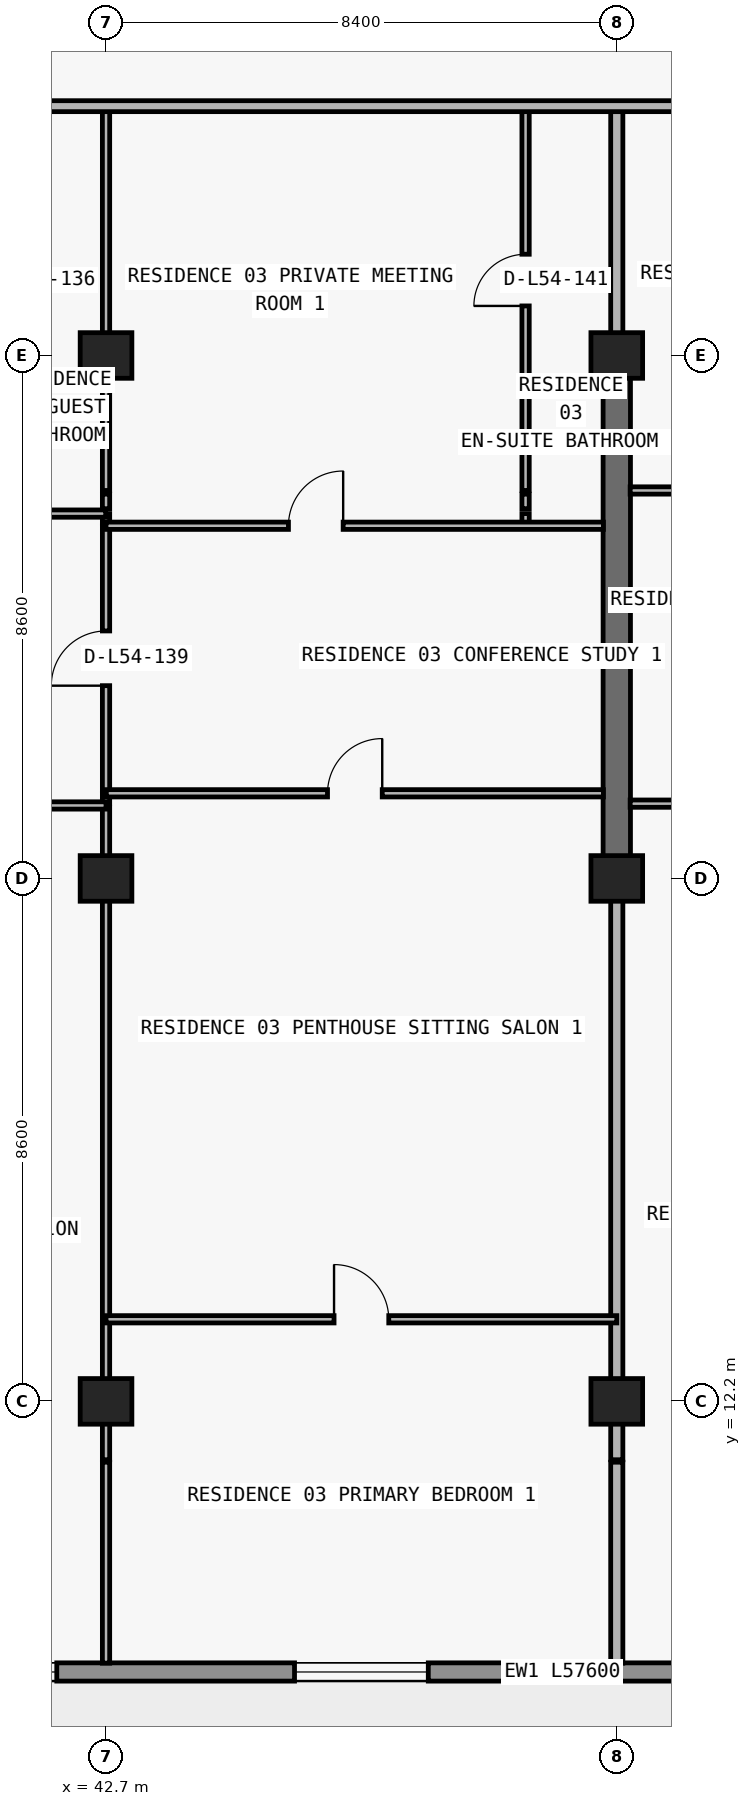
"""IFC4 building model, lengths in metres.
Left out: names, types, materials, properties, quantities, classifications, styles, units other than length and angle.
Written with IfcOpenShell. Run it as: python <this file> out.ifc"""

import sys

from ifc_helpers import new_model, si_unit, direction, frame, frame_2d, origin, origin_2d, place, context, subcontext, project, spatial, rectangle, extrude, element, fill, save


model = new_model("IFC4")
c1 = context("Model", 3, precision=1e-05, world=origin(), true_north=direction((0.0, 1.0)))
c2 = subcontext(c1, "Body", "Model", "MODEL_VIEW")
j1 = project(units=[si_unit("LENGTHUNIT", "METRE"), si_unit("PLANEANGLEUNIT", "RADIAN")], contexts=[c1])
p1 = place(None, origin())
s1 = spatial("IfcSite", under=j1, at=p1, CompositionType="ELEMENT")
p2 = place(p1, origin())
s2 = spatial("IfcBuilding", under=s1, at=p2, CompositionType="ELEMENT")
p3 = place(p2, frame((0.0, 0.0, 195.0)))
s3 = spatial("IfcBuildingStorey", under=s2, at=p3, CompositionType="ELEMENT", Elevation=195.0)
for number, where, z_axis, x_axis in (
    (1, (42.7, 12.2, 0.0), (0.0, 0.0, 1.0), (1.0, 0.0, 0.0)),
    (2, (51.1, 12.2, 0.0), (0.0, 0.0, 1.0), (1.0, 0.0, 0.0)),
    (3, (42.7, 20.8, 0.0), (0.0, 0.0, 1.0), (1.0, 0.0, 0.0)),
    (4, (51.1, 20.8, 0.0), (0.0, 0.0, 1.0), (1.0, 0.0, 0.0)),
    (5, (42.7, 29.4, 0.0), (0.0, 0.0, 1.0), (1.0, 0.0, 0.0)),
    (6, (51.1, 29.4, 0.0), (0.0, 0.0, 1.0), (1.0, 0.0, 0.0)),
):
    element("IfcColumn", number, at=place(p3, frame(where, z_axis=z_axis, x_axis=x_axis)), inside=s3, PredefinedType="COLUMN", context=c2, shape_type="SweptSolid", body=[
        extrude(rectangle(XDim=0.85, YDim=0.75, at=origin_2d()), origin(), (0.0, 0.0, 1.0), 3.05),
    ])
p4 = place(p3, frame((51.1, 20.8, 0.0), z_axis=(0.0, 0.0, 1.0), x_axis=(0.0, 1.0, 0.0)))
e7 = element("IfcWall", 7, at=p4, inside=s3, PredefinedType="SHEAR", context=c2, shape_type="SweptSolid", body=[
    extrude(rectangle(XDim=8.6, YDim=0.45, at=frame_2d((4.3, 0.0))), origin(), (0.0, 0.0, 1.0), 3.05),
])
p5 = place(p3, frame((67.7, 7.75, 0.0), z_axis=(0.0, 0.0, 1.0), x_axis=(-1.0, 0.0, 0.0)))
e8 = element("IfcWall", 8, at=p5, inside=s3, PredefinedType="STANDARD", context=c2, shape_type="SweptSolid", body=[
    extrude(rectangle(XDim=57.6, YDim=0.3, at=frame_2d((28.8, 0.0))), origin(), (0.0, 0.0, 1.0), 3.05),
])
p6 = place(p5, frame((54.69, 0.0, 0.0)))
e9 = element("IfcOpeningElement", 9, at=p6, cuts=e8, PredefinedType="OPENING", context=c2, shape_type="SweptSolid", body=[
    extrude(rectangle(XDim=2.0, YDim=2.3, at=frame_2d((1.0, 1.15))), frame((0.0, 0.16, 0.0), z_axis=(0.0, -1.0, 0.0), x_axis=(1.0, 0.0, 0.0)), (0.0, 0.0, 1.0), 0.32),
])
p7 = place(p5, frame((50.21, 0.0, 0.65)))
e10 = element("IfcOpeningElement", 10, at=p7, cuts=e8, PredefinedType="OPENING", context=c2, shape_type="SweptSolid", body=[
    extrude(rectangle(XDim=2.6, YDim=1.85, at=frame_2d((1.3, 0.925))), frame((0.0, 0.16, 0.0), z_axis=(0.0, -1.0, 0.0), x_axis=(1.0, 0.0, 0.0)), (0.0, 0.0, 1.0), 0.32),
])
p8 = place(p5, frame((44.1, 0.0, 0.85)))
e11 = element("IfcOpeningElement", 11, at=p8, cuts=e8, PredefinedType="OPENING", context=c2, shape_type="SweptSolid", body=[
    extrude(rectangle(XDim=2.2, YDim=1.55, at=frame_2d((1.1, 0.775))), frame((0.0, 0.16, 0.0), z_axis=(0.0, -1.0, 0.0), x_axis=(1.0, 0.0, 0.0)), (0.0, 0.0, 1.0), 0.32),
])
p9 = place(p5, frame((37.69, 0.0, 0.0)))
e12 = element("IfcOpeningElement", 12, at=p9, cuts=e8, PredefinedType="OPENING", context=c2, shape_type="SweptSolid", body=[
    extrude(rectangle(XDim=2.0, YDim=2.3, at=frame_2d((1.0, 1.15))), frame((0.0, 0.16, 0.0), z_axis=(0.0, -1.0, 0.0), x_axis=(1.0, 0.0, 0.0)), (0.0, 0.0, 1.0), 0.32),
])
p10 = place(p5, frame((33.59, 0.0, 0.85)))
e13 = element("IfcOpeningElement", 13, at=p10, cuts=e8, PredefinedType="OPENING", context=c2, shape_type="SweptSolid", body=[
    extrude(rectangle(XDim=1.8, YDim=1.55, at=frame_2d((0.9, 0.775))), frame((0.0, 0.16, 0.0), z_axis=(0.0, -1.0, 0.0), x_axis=(1.0, 0.0, 0.0)), (0.0, 0.0, 1.0), 0.32),
])
p11 = place(p5, frame((29.69, 0.0, 0.0)))
e14 = element("IfcOpeningElement", 14, at=p11, cuts=e8, PredefinedType="OPENING", context=c2, shape_type="SweptSolid", body=[
    extrude(rectangle(XDim=2.0, YDim=2.3, at=frame_2d((1.0, 1.15))), frame((0.0, 0.16, 0.0), z_axis=(0.0, -1.0, 0.0), x_axis=(1.0, 0.0, 0.0)), (0.0, 0.0, 1.0), 0.32),
])
p12 = place(p5, frame((25.81, 0.0, 0.65)))
e15 = element("IfcOpeningElement", 15, at=p12, cuts=e8, PredefinedType="OPENING", context=c2, shape_type="SweptSolid", body=[
    extrude(rectangle(XDim=2.6, YDim=1.85, at=frame_2d((1.3, 0.925))), frame((0.0, 0.16, 0.0), z_axis=(0.0, -1.0, 0.0), x_axis=(1.0, 0.0, 0.0)), (0.0, 0.0, 1.0), 0.32),
])
p13 = place(p5, frame((19.7, 0.0, 0.85)))
e16 = element("IfcOpeningElement", 16, at=p13, cuts=e8, PredefinedType="OPENING", context=c2, shape_type="SweptSolid", body=[
    extrude(rectangle(XDim=2.2, YDim=1.55, at=frame_2d((1.1, 0.775))), frame((0.0, 0.16, 0.0), z_axis=(0.0, -1.0, 0.0), x_axis=(1.0, 0.0, 0.0)), (0.0, 0.0, 1.0), 0.32),
])
p14 = place(p5, frame((13.29, 0.0, 0.0)))
e17 = element("IfcOpeningElement", 17, at=p14, cuts=e8, PredefinedType="OPENING", context=c2, shape_type="SweptSolid", body=[
    extrude(rectangle(XDim=2.0, YDim=2.3, at=frame_2d((1.0, 1.15))), frame((0.0, 0.16, 0.0), z_axis=(0.0, -1.0, 0.0), x_axis=(1.0, 0.0, 0.0)), (0.0, 0.0, 1.0), 0.32),
])
p15 = place(p5, frame((9.19, 0.0, 0.85)))
e18 = element("IfcOpeningElement", 18, at=p15, cuts=e8, PredefinedType="OPENING", context=c2, shape_type="SweptSolid", body=[
    extrude(rectangle(XDim=1.8, YDim=1.55, at=frame_2d((0.9, 0.775))), frame((0.0, 0.16, 0.0), z_axis=(0.0, -1.0, 0.0), x_axis=(1.0, 0.0, 0.0)), (0.0, 0.0, 1.0), 0.32),
])
p16 = place(p5, frame((5.273, 0.0, 0.0)))
e19 = element("IfcOpeningElement", 19, at=p16, cuts=e8, PredefinedType="OPENING", context=c2, shape_type="SweptSolid", body=[
    extrude(rectangle(XDim=2.0, YDim=2.3, at=frame_2d((1.0, 1.15))), frame((0.0, 0.16, 0.0), z_axis=(0.0, -1.0, 0.0), x_axis=(1.0, 0.0, 0.0)), (0.0, 0.0, 1.0), 0.32),
])
p17 = place(p5, frame((1.073, 0.0, 0.85)))
e20 = element("IfcOpeningElement", 20, at=p17, cuts=e8, PredefinedType="OPENING", context=c2, shape_type="SweptSolid", body=[
    extrude(rectangle(XDim=2.2, YDim=1.55, at=frame_2d((1.1, 0.775))), frame((0.0, 0.16, 0.0), z_axis=(0.0, -1.0, 0.0), x_axis=(1.0, 0.0, 0.0)), (0.0, 0.0, 1.0), 0.32),
])
p18 = place(p3, frame((42.7, 7.895, 0.0), z_axis=(0.0, 0.0, 1.0), x_axis=(0.0, 1.0, 0.0)))
e21 = element("IfcWall", 21, at=p18, inside=s3, PredefinedType="PARTITIONING", context=c2, shape_type="SweptSolid", body=[
    extrude(rectangle(XDim=3.305, YDim=0.12, at=frame_2d((1.652, 0.0))), origin(), (0.0, 0.0, 1.0), 3.05),
])
p19 = place(p3, frame((42.7, 11.24, 0.0), z_axis=(0.0, 0.0, 1.0), x_axis=(0.0, 1.0, 0.0)))
e22 = element("IfcWall", 22, at=p19, inside=s3, PredefinedType="PARTITIONING", context=c2, shape_type="SweptSolid", body=[
    extrude(rectangle(XDim=10.73, YDim=0.12, at=frame_2d((5.365, 0.0))), origin(), (0.0, 0.0, 1.0), 2.263),
])
p20 = place(p3, frame((42.7, 22.04, 0.0), z_axis=(0.0, 0.0, 1.0), x_axis=(0.0, 1.0, 0.0)))
e23 = element("IfcWall", 23, at=p20, inside=s3, PredefinedType="PARTITIONING", context=c2, shape_type="SweptSolid", body=[
    extrude(rectangle(XDim=0.16, YDim=0.12, at=frame_2d((0.08, 0.0))), origin(), (0.0, 0.0, 1.0), 2.263),
])
p21 = place(p3, frame((42.7, 22.24, 0.0), z_axis=(0.0, 0.0, 1.0), x_axis=(0.0, 1.0, 0.0)))
e24 = element("IfcWall", 24, at=p21, inside=s3, PredefinedType="PARTITIONING", context=c2, shape_type="SweptSolid", body=[
    extrude(rectangle(XDim=4.36, YDim=0.12, at=frame_2d((2.18, 0.0))), origin(), (0.0, 0.0, 1.0), 2.263),
])
p22 = place(p21, frame((1.73, 0.0, 0.0)))
e25 = element("IfcOpeningElement", 25, at=p22, cuts=e24, PredefinedType="OPENING", context=c2, shape_type="SweptSolid", body=[
    extrude(rectangle(XDim=0.9, YDim=2.15, at=frame_2d((0.45, 1.075))), frame((0.0, 0.07, 0.0), z_axis=(0.0, -1.0, 0.0), x_axis=(1.0, 0.0, 0.0)), (0.0, 0.0, 1.0), 0.14),
])
p23 = place(p3, frame((42.7, 26.64, 0.0), z_axis=(0.0, 0.0, 1.0), x_axis=(0.0, 1.0, 0.0)))
e26 = element("IfcWall", 26, at=p23, inside=s3, PredefinedType="PARTITIONING", context=c2, shape_type="SweptSolid", body=[
    extrude(rectangle(XDim=0.16, YDim=0.12, at=frame_2d((0.08, 0.0))), origin(), (0.0, 0.0, 1.0), 2.263),
])
p24 = place(p3, frame((42.7, 26.88, 0.0), z_axis=(0.0, 0.0, 1.0), x_axis=(0.0, 1.0, 0.0)))
e27 = element("IfcWall", 27, at=p24, inside=s3, PredefinedType="PARTITIONING", context=c2, shape_type="SweptSolid", body=[
    extrude(rectangle(XDim=0.24, YDim=0.12, at=frame_2d((0.12, 0.0))), origin(), (0.0, 0.0, 1.0), 2.263),
])
p25 = place(p3, frame((42.7, 27.18, 0.0), z_axis=(0.0, 0.0, 1.0), x_axis=(0.0, 1.0, 0.0)))
e28 = element("IfcWall", 28, at=p25, inside=s3, PredefinedType="PARTITIONING", context=c2, shape_type="SweptSolid", body=[
    extrude(rectangle(XDim=6.32, YDim=0.12, at=frame_2d((3.16, 0.0))), origin(), (0.0, 0.0, 1.0), 2.263),
])
p26 = place(p3, frame((49.6, 26.64, 0.0), z_axis=(0.0, 0.0, 1.0), x_axis=(0.0, 1.0, 0.0)))
e29 = element("IfcWall", 29, at=p26, inside=s3, PredefinedType="PARTITIONING", context=c2, shape_type="SweptSolid", body=[
    extrude(rectangle(XDim=0.16, YDim=0.12, at=frame_2d((0.08, 0.0))), origin(), (0.0, 0.0, 1.0), 3.05),
])
p27 = place(p3, frame((49.6, 26.88, 0.0), z_axis=(0.0, 0.0, 1.0), x_axis=(0.0, 1.0, 0.0)))
e30 = element("IfcWall", 30, at=p27, inside=s3, PredefinedType="PARTITIONING", context=c2, shape_type="SweptSolid", body=[
    extrude(rectangle(XDim=0.24, YDim=0.12, at=frame_2d((0.12, 0.0))), origin(), (0.0, 0.0, 1.0), 3.05),
])
p28 = place(p3, frame((49.6, 27.18, 0.0), z_axis=(0.0, 0.0, 1.0), x_axis=(0.0, 1.0, 0.0)))
e31 = element("IfcWall", 31, at=p28, inside=s3, PredefinedType="PARTITIONING", context=c2, shape_type="SweptSolid", body=[
    extrude(rectangle(XDim=6.32, YDim=0.12, at=frame_2d((3.16, 0.0))), origin(), (0.0, 0.0, 1.0), 3.05),
])
p29 = place(p28, frame((3.035, 0.0, 0.0)))
e32 = element("IfcOpeningElement", 32, at=p29, cuts=e31, PredefinedType="OPENING", context=c2, shape_type="SweptSolid", body=[
    extrude(rectangle(XDim=0.85, YDim=2.1, at=frame_2d((0.425, 1.05))), frame((0.0, 0.07, 0.0), z_axis=(0.0, -1.0, 0.0), x_axis=(1.0, 0.0, 0.0)), (0.0, 0.0, 1.0), 0.14),
])
p30 = place(p3, frame((51.1, 7.895, 0.0), z_axis=(0.0, 0.0, 1.0), x_axis=(0.0, 1.0, 0.0)))
e33 = element("IfcWall", 33, at=p30, inside=s3, PredefinedType="PARTITIONING", context=c2, shape_type="SweptSolid", body=[
    extrude(rectangle(XDim=3.305, YDim=0.2, at=frame_2d((1.652, 0.0))), origin(), (0.0, 0.0, 1.0), 3.05),
])
p31 = place(p3, frame((51.1, 11.24, 0.0), z_axis=(0.0, 0.0, 1.0), x_axis=(0.0, 1.0, 0.0)))
e34 = element("IfcWall", 34, at=p31, inside=s3, PredefinedType="PARTITIONING", context=c2, shape_type="SweptSolid", body=[
    extrude(rectangle(XDim=9.555, YDim=0.2, at=frame_2d((4.777, 0.0))), origin(), (0.0, 0.0, 1.0), 2.263),
])
p32 = place(p3, frame((51.1, 29.405, 0.0), z_axis=(0.0, 0.0, 1.0), x_axis=(0.0, 1.0, 0.0)))
e35 = element("IfcWall", 35, at=p32, inside=s3, PredefinedType="PARTITIONING", context=c2, shape_type="SweptSolid", body=[
    extrude(rectangle(XDim=4.095, YDim=0.2, at=frame_2d((2.047, 0.0))), origin(), (0.0, 0.0, 1.0), 2.335),
])
p33 = place(p3, frame((42.7, 13.55, 0.0), z_axis=(0.0, 0.0, 1.0), x_axis=(1.0, 0.0, 0.0)))
e36 = element("IfcWall", 36, at=p33, inside=s3, PredefinedType="PARTITIONING", context=c2, shape_type="SweptSolid", body=[
    extrude(rectangle(XDim=8.4, YDim=0.12, at=frame_2d((4.2, 0.0))), origin(), (0.0, 0.0, 1.0), 3.05),
])
p34 = place(p33, frame((3.75, 0.0, 0.0)))
e37 = element("IfcOpeningElement", 37, at=p34, cuts=e36, PredefinedType="OPENING", context=c2, shape_type="SweptSolid", body=[
    extrude(rectangle(XDim=0.9, YDim=2.15, at=frame_2d((0.45, 1.075))), frame((0.0, 0.07, 0.0), z_axis=(0.0, -1.0, 0.0), x_axis=(1.0, 0.0, 0.0)), (0.0, 0.0, 1.0), 0.14),
])
p35 = place(p3, frame((35.105, 22.0, 0.0), z_axis=(0.0, 0.0, 1.0), x_axis=(1.0, 0.0, 0.0)))
e38 = element("IfcWall", 38, at=p35, inside=s3, PredefinedType="PARTITIONING", context=c2, shape_type="SweptSolid", body=[
    extrude(rectangle(XDim=7.595, YDim=0.12, at=frame_2d((3.797, 0.0))), origin(), (0.0, 0.0, 1.0), 3.05),
])
p36 = place(p35, frame((3.347, 0.0, 0.0)))
e39 = element("IfcOpeningElement", 39, at=p36, cuts=e38, PredefinedType="OPENING", context=c2, shape_type="SweptSolid", body=[
    extrude(rectangle(XDim=0.9, YDim=2.15, at=frame_2d((0.45, 1.075))), frame((0.0, 0.07, 0.0), z_axis=(0.0, -1.0, 0.0), x_axis=(1.0, 0.0, 0.0)), (0.0, 0.0, 1.0), 0.14),
])
p37 = place(p3, frame((51.32, 22.03, 0.0), z_axis=(0.0, 0.0, 1.0), x_axis=(1.0, 0.0, 0.0)))
e40 = element("IfcWall", 40, at=p37, inside=s3, PredefinedType="PARTITIONING", context=c2, shape_type="SweptSolid", body=[
    extrude(rectangle(XDim=8.18, YDim=0.12, at=frame_2d((4.09, 0.0))), origin(), (0.0, 0.0, 1.0), 3.05),
])
p38 = place(p37, frame((1.708, 0.0, 0.0)))
e41 = element("IfcOpeningElement", 41, at=p38, cuts=e40, PredefinedType="OPENING", context=c2, shape_type="SweptSolid", body=[
    extrude(rectangle(XDim=0.9, YDim=2.15, at=frame_2d((0.45, 1.075))), frame((0.0, 0.07, 0.0), z_axis=(0.0, -1.0, 0.0), x_axis=(1.0, 0.0, 0.0)), (0.0, 0.0, 1.0), 0.14),
])
p39 = place(p37, frame((5.84, 0.0, 0.0)))
e42 = element("IfcOpeningElement", 42, at=p39, cuts=e40, PredefinedType="OPENING", context=c2, shape_type="SweptSolid", body=[
    extrude(rectangle(XDim=0.9, YDim=2.15, at=frame_2d((0.45, 1.075))), frame((0.0, 0.07, 0.0), z_axis=(0.0, -1.0, 0.0), x_axis=(1.0, 0.0, 0.0)), (0.0, 0.0, 1.0), 0.14),
])
p40 = place(p3, frame((42.705, 22.2, 0.0), z_axis=(0.0, 0.0, 1.0), x_axis=(1.0, 0.0, 0.0)))
e43 = element("IfcWall", 43, at=p40, inside=s3, PredefinedType="PARTITIONING", context=c2, shape_type="SweptSolid", body=[
    extrude(rectangle(XDim=8.175, YDim=0.12, at=frame_2d((4.087, 0.0))), origin(), (0.0, 0.0, 1.0), 3.05),
])
p41 = place(p40, frame((3.637, 0.0, 0.0)))
e44 = element("IfcOpeningElement", 44, at=p41, cuts=e43, PredefinedType="OPENING", context=c2, shape_type="SweptSolid", body=[
    extrude(rectangle(XDim=0.9, YDim=2.15, at=frame_2d((0.45, 1.075))), frame((0.0, 0.07, 0.0), z_axis=(0.0, -1.0, 0.0), x_axis=(1.0, 0.0, 0.0)), (0.0, 0.0, 1.0), 0.14),
])
p42 = place(p3, frame((42.7, 26.6, 0.0), z_axis=(0.0, 0.0, 1.0), x_axis=(1.0, 0.0, 0.0)))
e45 = element("IfcWall", 45, at=p42, inside=s3, PredefinedType="PARTITIONING", context=c2, shape_type="SweptSolid", body=[
    extrude(rectangle(XDim=8.18, YDim=0.12, at=frame_2d((4.09, 0.0))), origin(), (0.0, 0.0, 1.0), 3.05),
])
p43 = place(p42, frame((3.0, 0.0, 0.0)))
e46 = element("IfcOpeningElement", 46, at=p43, cuts=e45, PredefinedType="OPENING", context=c2, shape_type="SweptSolid", body=[
    extrude(rectangle(XDim=0.9, YDim=2.15, at=frame_2d((0.45, 1.075))), frame((0.0, 0.07, 0.0), z_axis=(0.0, -1.0, 0.0), x_axis=(1.0, 0.0, 0.0)), (0.0, 0.0, 1.0), 0.14),
])
p44 = place(p3, frame((35.1, 26.8, 0.0), z_axis=(0.0, 0.0, 1.0), x_axis=(1.0, 0.0, 0.0)))
e47 = element("IfcWall", 47, at=p44, inside=s3, PredefinedType="PARTITIONING", context=c2, shape_type="SweptSolid", body=[
    extrude(rectangle(XDim=7.595, YDim=0.12, at=frame_2d((3.797, 0.0))), origin(), (0.0, 0.0, 1.0), 3.05),
])
p45 = place(p44, frame((2.582, 0.0, 0.0)))
e48 = element("IfcOpeningElement", 48, at=p45, cuts=e47, PredefinedType="OPENING", context=c2, shape_type="SweptSolid", body=[
    extrude(rectangle(XDim=0.9, YDim=2.15, at=frame_2d((0.45, 1.075))), frame((0.0, 0.07, 0.0), z_axis=(0.0, -1.0, 0.0), x_axis=(1.0, 0.0, 0.0)), (0.0, 0.0, 1.0), 0.14),
])
p46 = place(p3, frame((51.32, 27.18, 0.0), z_axis=(0.0, 0.0, 1.0), x_axis=(1.0, 0.0, 0.0)))
e49 = element("IfcWall", 49, at=p46, inside=s3, PredefinedType="PARTITIONING", context=c2, shape_type="SweptSolid", body=[
    extrude(rectangle(XDim=8.18, YDim=0.12, at=frame_2d((4.09, 0.0))), origin(), (0.0, 0.0, 1.0), 3.05),
])
p47 = place(p46, frame((1.708, 0.0, 0.0)))
e50 = element("IfcOpeningElement", 50, at=p47, cuts=e49, PredefinedType="OPENING", context=c2, shape_type="SweptSolid", body=[
    extrude(rectangle(XDim=0.9, YDim=2.15, at=frame_2d((0.45, 1.075))), frame((0.0, 0.07, 0.0), z_axis=(0.0, -1.0, 0.0), x_axis=(1.0, 0.0, 0.0)), (0.0, 0.0, 1.0), 0.14),
])
p48 = place(p3, frame((10.105, 33.5, 0.0), z_axis=(0.0, 0.0, 1.0), x_axis=(1.0, 0.0, 0.0)))
e51 = element("IfcWall", 51, at=p48, inside=s3, PredefinedType="PARTITIONING", context=c2, shape_type="SweptSolid", body=[
    extrude(rectangle(XDim=57.595, YDim=0.18, at=frame_2d((28.797, 0.0))), origin(), (0.0, 0.0, 1.0), 3.05),
])
p49 = place(p48, frame((2.824, 0.0, 0.0)))
e52 = element("IfcOpeningElement", 52, at=p49, cuts=e51, PredefinedType="OPENING", context=c2, shape_type="SweptSolid", body=[
    extrude(rectangle(XDim=1.0, YDim=2.2, at=frame_2d((0.5, 1.1))), frame((0.0, 0.1, 0.0), z_axis=(0.0, -1.0, 0.0), x_axis=(1.0, 0.0, 0.0)), (0.0, 0.0, 1.0), 0.2),
])
p50 = place(p48, frame((19.47, 0.0, 0.0)))
e53 = element("IfcOpeningElement", 53, at=p50, cuts=e51, PredefinedType="OPENING", context=c2, shape_type="SweptSolid", body=[
    extrude(rectangle(XDim=1.0, YDim=2.2, at=frame_2d((0.5, 1.1))), frame((0.0, 0.1, 0.0), z_axis=(0.0, -1.0, 0.0), x_axis=(1.0, 0.0, 0.0)), (0.0, 0.0, 1.0), 0.2),
])
p51 = place(p48, frame((27.527, 0.0, 0.0)))
e54 = element("IfcOpeningElement", 54, at=p51, cuts=e51, PredefinedType="OPENING", context=c2, shape_type="SweptSolid", body=[
    extrude(rectangle(XDim=1.0, YDim=2.2, at=frame_2d((0.5, 1.1))), frame((0.0, 0.1, 0.0), z_axis=(0.0, -1.0, 0.0), x_axis=(1.0, 0.0, 0.0)), (0.0, 0.0, 1.0), 0.2),
])
p52 = place(p48, frame((43.87, 0.0, 0.0)))
e55 = element("IfcOpeningElement", 55, at=p52, cuts=e51, PredefinedType="OPENING", context=c2, shape_type="SweptSolid", body=[
    extrude(rectangle(XDim=1.0, YDim=2.2, at=frame_2d((0.5, 1.1))), frame((0.0, 0.1, 0.0), z_axis=(0.0, -1.0, 0.0), x_axis=(1.0, 0.0, 0.0)), (0.0, 0.0, 1.0), 0.2),
])
p53 = place(p48, frame((52.17, 0.0, 0.0)))
e56 = element("IfcOpeningElement", 56, at=p53, cuts=e51, PredefinedType="OPENING", context=c2, shape_type="SweptSolid", body=[
    extrude(rectangle(XDim=1.0, YDim=2.2, at=frame_2d((0.5, 1.1))), frame((0.0, 0.1, 0.0), z_axis=(0.0, -1.0, 0.0), x_axis=(1.0, 0.0, 0.0)), (0.0, 0.0, 1.0), 0.2),
])
p54 = place(p12, origin())
e57 = element("IfcWindow", 57, at=p54, inside=s3, PartitioningType="SINGLE_PANEL", PredefinedType="WINDOW", context=c2, shape_type="SweptSolid", body=[
    extrude(rectangle(XDim=2.6, YDim=1.85, at=frame_2d((1.3, 0.925))), frame((0.0, 0.03, 0.0), z_axis=(0.0, -1.0, 0.0), x_axis=(1.0, 0.0, 0.0)), (0.0, 0.0, 1.0), 0.06),
])
fill(e15, e57)
p55 = place(p13, origin())
e58 = element("IfcWindow", 58, at=p55, inside=s3, PartitioningType="SINGLE_PANEL", PredefinedType="WINDOW", context=c2, shape_type="SweptSolid", body=[
    extrude(rectangle(XDim=2.2, YDim=1.55, at=frame_2d((1.1, 0.775))), frame((0.0, 0.03, 0.0), z_axis=(0.0, -1.0, 0.0), x_axis=(1.0, 0.0, 0.0)), (0.0, 0.0, 1.0), 0.06),
])
fill(e16, e58)
p56 = place(p22, origin())
e59 = element("IfcDoor", 59, at=p56, inside=s3, OperationType="SINGLE_SWING_LEFT", PredefinedType="DOOR", context=c2, shape_type="SweptSolid", body=[
    extrude(rectangle(XDim=0.9, YDim=2.15, at=frame_2d((0.45, 1.075))), frame((0.0, 0.025, 0.0), z_axis=(0.0, -1.0, 0.0), x_axis=(1.0, 0.0, 0.0)), (0.0, 0.0, 1.0), 0.05),
])
fill(e25, e59)
p57 = place(p43, origin())
e60 = element("IfcDoor", 60, at=p57, inside=s3, OperationType="SINGLE_SWING_RIGHT", PredefinedType="DOOR", context=c2, shape_type="SweptSolid", body=[
    extrude(rectangle(XDim=0.9, YDim=2.15, at=frame_2d((0.45, 1.075))), frame((0.0, 0.025, 0.0), z_axis=(0.0, -1.0, 0.0), x_axis=(1.0, 0.0, 0.0)), (0.0, 0.0, 1.0), 0.05),
])
fill(e46, e60)
p58 = place(p29, origin())
e61 = element("IfcDoor", 61, at=p58, inside=s3, OperationType="SINGLE_SWING_LEFT", PredefinedType="DOOR", context=c2, shape_type="SweptSolid", body=[
    extrude(rectangle(XDim=0.85, YDim=2.1, at=frame_2d((0.425, 1.05))), frame((0.0, 0.025, 0.0), z_axis=(0.0, -1.0, 0.0), x_axis=(1.0, 0.0, 0.0)), (0.0, 0.0, 1.0), 0.05),
])
fill(e32, e61)
p59 = place(p41, origin())
e62 = element("IfcDoor", 62, at=p59, inside=s3, OperationType="SINGLE_SWING_RIGHT", PredefinedType="DOOR", context=c2, shape_type="SweptSolid", body=[
    extrude(rectangle(XDim=0.9, YDim=2.15, at=frame_2d((0.45, 1.075))), frame((0.0, 0.025, 0.0), z_axis=(0.0, -1.0, 0.0), x_axis=(1.0, 0.0, 0.0)), (0.0, 0.0, 1.0), 0.05),
])
fill(e44, e62)
p60 = place(p34, origin())
e63 = element("IfcDoor", 63, at=p60, inside=s3, OperationType="SINGLE_SWING_LEFT", PredefinedType="DOOR", context=c2, shape_type="SweptSolid", body=[
    extrude(rectangle(XDim=0.9, YDim=2.15, at=frame_2d((0.45, 1.075))), frame((0.0, 0.025, 0.0), z_axis=(0.0, -1.0, 0.0), x_axis=(1.0, 0.0, 0.0)), (0.0, 0.0, 1.0), 0.05),
])
fill(e37, e63)
save(model, sys.argv[1])
